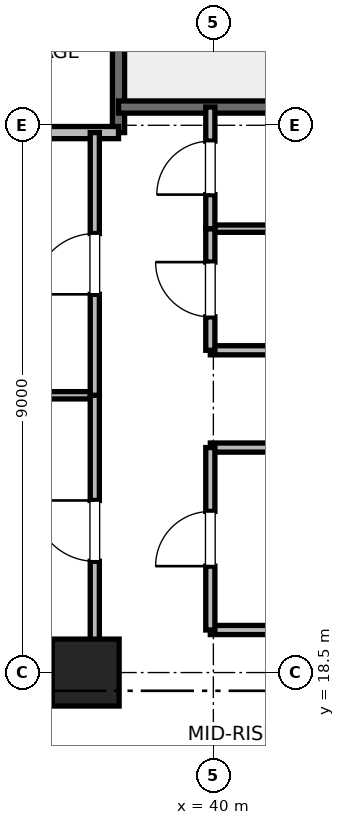
"""IFC4 building model, lengths in metres.
Left out: names, types, materials, properties, quantities, classifications, styles, units other than length and angle.
Written with IfcOpenShell. Run it as: python <this file> out.ifc"""

import sys

from ifc_helpers import new_model, si_unit, direction, frame, frame_2d, origin, origin_2d, place, context, subcontext, project, spatial, rectangle, extrude, element, fill, save


model = new_model("IFC4")
c1 = context("Model", 3, precision=1e-05, world=origin(), true_north=direction((0.0, 1.0)))
c2 = subcontext(c1, "Body", "Model", "MODEL_VIEW")
j1 = project(units=[si_unit("LENGTHUNIT", "METRE"), si_unit("PLANEANGLEUNIT", "RADIAN")], contexts=[c1])
p1 = place(None, origin())
s1 = spatial("IfcSite", under=j1, at=p1, CompositionType="ELEMENT")
p2 = place(p1, origin())
s2 = spatial("IfcBuilding", under=s1, at=p2, CompositionType="ELEMENT")
p3 = place(p2, frame((0.0, 0.0, 144.4)))
s3 = spatial("IfcBuildingStorey", under=s2, at=p3, CompositionType="ELEMENT", Elevation=144.4)
p4 = place(p3, frame((37.9, 18.5, 0.0), z_axis=(0.0, 0.0, 1.0), x_axis=(1.0, 0.0, 0.0)))
e1 = element("IfcColumn", 1, at=p4, inside=s3, PredefinedType="PILASTER", context=c2, shape_type="SweptSolid", body=[
    extrude(rectangle(XDim=1.1, YDim=1.1, at=origin_2d()), origin(), (0.0, 0.0, 1.0), 4.0),
])
p5 = place(p3, frame((29.0, 18.5, 0.0), z_axis=(0.0, 0.0, 1.0), x_axis=(1.0, 0.0, 0.0)))
e2 = element("IfcWall", 2, at=p5, inside=s3, PredefinedType="SHEAR", context=c2, shape_type="SweptSolid", body=[
    extrude(rectangle(XDim=9.2, YDim=0.55, at=frame_2d((4.6, 0.0))), origin(), (0.0, 0.0, 1.0), 3.775),
])
p6 = place(p3, frame((38.44, 27.38, 0.0), z_axis=(0.0, 0.0, 1.0), x_axis=(0.0, 1.0, 0.0)))
e3 = element("IfcWall", 3, at=p6, inside=s3, PredefinedType="SOLIDWALL", context=c2, shape_type="SweptSolid", body=[
    extrude(rectangle(XDim=8.87, YDim=0.2, at=frame_2d((4.435, 0.0))), origin(), (0.0, 0.0, 1.0), 3.775),
])
p7 = place(p3, frame((38.44, 27.8, 0.0), z_axis=(0.0, 0.0, 1.0), x_axis=(1.0, 0.0, 0.0)))
e4 = element("IfcWall", 4, at=p7, inside=s3, PredefinedType="SOLIDWALL", context=c2, shape_type="SweptSolid", body=[
    extrude(rectangle(XDim=3.32, YDim=0.2, at=frame_2d((1.66, 0.0))), origin(), (0.0, 0.0, 1.0), 3.775),
])
p8 = place(p3, frame((32.82, 27.38, 0.0), z_axis=(0.0, 0.0, 1.0), x_axis=(1.0, 0.0, 0.0)))
e5 = element("IfcWall", 5, at=p8, inside=s3, PredefinedType="PARTITIONING", context=c2, shape_type="SweptSolid", body=[
    extrude(rectangle(XDim=5.62, YDim=0.2, at=frame_2d((2.81, 0.0))), origin(), (0.0, 0.0, 1.0), 3.775),
])
for number, where, z_axis, x_axis in (
    (6, (39.95, 19.2, 0.0), (0.0, 0.0, 1.0), (1.0, 0.0, 0.0)),
    (7, (39.95, 22.2, 0.0), (0.0, 0.0, 1.0), (1.0, 0.0, 0.0)),
    (8, (39.95, 23.8, 0.0), (0.0, 0.0, 1.0), (1.0, 0.0, 0.0)),
):
    element("IfcWall", number, at=place(p3, frame(where, z_axis=z_axis, x_axis=x_axis)), inside=s3, PredefinedType="PARTITIONING", context=c2, shape_type="SweptSolid", body=[
        extrude(rectangle(XDim=1.81, YDim=0.15, at=frame_2d((0.905, 0.0))), origin(), (0.0, 0.0, 1.0), 2.85),
    ])
p9 = place(p3, frame((39.95, 25.8, 0.0), z_axis=(0.0, 0.0, 1.0), x_axis=(1.0, 0.0, 0.0)))
e9 = element("IfcWall", 9, at=p9, inside=s3, PredefinedType="PARTITIONING", context=c2, shape_type="SweptSolid", body=[
    extrude(rectangle(XDim=1.81, YDim=0.12, at=frame_2d((0.905, 0.0))), origin(), (0.0, 0.0, 1.0), 2.85),
])
p10 = place(p3, frame((39.95, 19.2, 0.0), z_axis=(0.0, 0.0, 1.0), x_axis=(0.0, 1.0, 0.0)))
e10 = element("IfcWall", 10, at=p10, inside=s3, PredefinedType="PARTITIONING", context=c2, shape_type="SweptSolid", body=[
    extrude(rectangle(XDim=3.0, YDim=0.15, at=frame_2d((1.5, 0.0))), origin(), (0.0, 0.0, 1.0), 2.85),
])
p11 = place(p10, frame((1.05, 0.0, 0.0)))
e11 = element("IfcOpeningElement", 11, at=p11, cuts=e10, PredefinedType="OPENING", context=c2, shape_type="SweptSolid", body=[
    extrude(rectangle(XDim=0.9, YDim=2.1, at=frame_2d((0.45, 1.05))), frame((0.0, 0.075, 0.0), z_axis=(0.0, -1.0, 0.0), x_axis=(1.0, 0.0, 0.0)), (0.0, 0.0, 1.0), 0.15),
])
p12 = place(p3, frame((39.95, 23.8, 0.0), z_axis=(0.0, 0.0, 1.0), x_axis=(0.0, 1.0, 0.0)))
e12 = element("IfcWall", 12, at=p12, inside=s3, PredefinedType="PARTITIONING", context=c2, shape_type="SweptSolid", body=[
    extrude(rectangle(XDim=2.0, YDim=0.15, at=frame_2d((1.0, 0.0))), origin(), (0.0, 0.0, 1.0), 2.85),
])
p13 = place(p12, frame((0.55, 0.0, 0.0)))
e13 = element("IfcOpeningElement", 13, at=p13, cuts=e12, PredefinedType="OPENING", context=c2, shape_type="SweptSolid", body=[
    extrude(rectangle(XDim=0.9, YDim=2.1, at=frame_2d((0.45, 1.05))), frame((0.0, 0.075, 0.0), z_axis=(0.0, -1.0, 0.0), x_axis=(1.0, 0.0, 0.0)), (0.0, 0.0, 1.0), 0.15),
])
p14 = place(p3, frame((39.95, 25.8, 0.0), z_axis=(0.0, 0.0, 1.0), x_axis=(0.0, 1.0, 0.0)))
e14 = element("IfcWall", 14, at=p14, inside=s3, PredefinedType="PARTITIONING", context=c2, shape_type="SweptSolid", body=[
    extrude(rectangle(XDim=2.0, YDim=0.15, at=frame_2d((1.0, 0.0))), origin(), (0.0, 0.0, 1.0), 2.85),
])
p15 = place(p14, frame((0.56, 0.0, 0.0)))
e15 = element("IfcOpeningElement", 15, at=p15, cuts=e14, PredefinedType="OPENING", context=c2, shape_type="SweptSolid", body=[
    extrude(rectangle(XDim=0.88, YDim=2.1, at=frame_2d((0.44, 1.05))), frame((0.0, 0.075, 0.0), z_axis=(0.0, -1.0, 0.0), x_axis=(1.0, 0.0, 0.0)), (0.0, 0.0, 1.0), 0.15),
])
p16 = place(p3, frame((32.82, 23.06, 0.0), z_axis=(0.0, 0.0, 1.0), x_axis=(1.0, 0.0, 0.0)))
e16 = element("IfcWall", 16, at=p16, inside=s3, PredefinedType="PARTITIONING", context=c2, shape_type="SweptSolid", body=[
    extrude(rectangle(XDim=5.23, YDim=0.12, at=frame_2d((2.615, 0.0))), origin(), (0.0, 0.0, 1.0), 2.85),
])
p17 = place(p3, frame((38.05, 18.6, 0.0), z_axis=(0.0, 0.0, 1.0), x_axis=(0.0, 1.0, 0.0)))
e17 = element("IfcWall", 17, at=p17, inside=s3, PredefinedType="PARTITIONING", context=c2, shape_type="SweptSolid", body=[
    extrude(rectangle(XDim=4.46, YDim=0.15, at=frame_2d((2.23, 0.0))), origin(), (0.0, 0.0, 1.0), 2.755),
])
p18 = place(p17, frame((1.73, 0.0, 0.0)))
e18 = element("IfcOpeningElement", 18, at=p18, cuts=e17, PredefinedType="OPENING", context=c2, shape_type="SweptSolid", body=[
    extrude(rectangle(XDim=1.0, YDim=2.15, at=frame_2d((0.5, 1.075))), frame((0.0, 0.075, 0.0), z_axis=(0.0, -1.0, 0.0), x_axis=(1.0, 0.0, 0.0)), (0.0, 0.0, 1.0), 0.15),
])
p19 = place(p3, frame((38.05, 23.06, 0.0), z_axis=(0.0, 0.0, 1.0), x_axis=(0.0, 1.0, 0.0)))
e19 = element("IfcWall", 19, at=p19, inside=s3, PredefinedType="PARTITIONING", context=c2, shape_type="SweptSolid", body=[
    extrude(rectangle(XDim=4.32, YDim=0.15, at=frame_2d((2.16, 0.0))), origin(), (0.0, 0.0, 1.0), 2.85),
])
p20 = place(p19, frame((1.66, 0.0, 0.0)))
e20 = element("IfcOpeningElement", 20, at=p20, cuts=e19, PredefinedType="OPENING", context=c2, shape_type="SweptSolid", body=[
    extrude(rectangle(XDim=1.0, YDim=2.15, at=frame_2d((0.5, 1.075))), frame((0.0, 0.075, 0.0), z_axis=(0.0, -1.0, 0.0), x_axis=(1.0, 0.0, 0.0)), (0.0, 0.0, 1.0), 0.15),
])
p21 = place(p11, origin())
e21 = element("IfcDoor", 21, at=p21, inside=s3, OperationType="SINGLE_SWING_LEFT", PredefinedType="DOOR", context=c2, shape_type="SweptSolid", body=[
    extrude(rectangle(XDim=0.9, YDim=2.1, at=frame_2d((0.45, 1.05))), frame((0.0, 0.025, 0.0), z_axis=(0.0, -1.0, 0.0), x_axis=(1.0, 0.0, 0.0)), (0.0, 0.0, 1.0), 0.05),
])
fill(e11, e21)
p22 = place(p13, origin())
e22 = element("IfcDoor", 22, at=p22, inside=s3, OperationType="SINGLE_SWING_RIGHT", PredefinedType="DOOR", context=c2, shape_type="SweptSolid", body=[
    extrude(rectangle(XDim=0.9, YDim=2.1, at=frame_2d((0.45, 1.05))), frame((0.0, 0.025, 0.0), z_axis=(0.0, -1.0, 0.0), x_axis=(1.0, 0.0, 0.0)), (0.0, 0.0, 1.0), 0.05),
])
fill(e13, e22)
p23 = place(p15, origin())
e23 = element("IfcDoor", 23, at=p23, inside=s3, OperationType="SINGLE_SWING_LEFT", PredefinedType="DOOR", context=c2, shape_type="SweptSolid", body=[
    extrude(rectangle(XDim=0.88, YDim=2.1, at=frame_2d((0.44, 1.05))), frame((0.0, 0.025, 0.0), z_axis=(0.0, -1.0, 0.0), x_axis=(1.0, 0.0, 0.0)), (0.0, 0.0, 1.0), 0.05),
])
fill(e15, e23)
p24 = place(p18, origin())
e24 = element("IfcDoor", 24, at=p24, inside=s3, OperationType="SINGLE_SWING_RIGHT", PredefinedType="DOOR", context=c2, shape_type="SweptSolid", body=[
    extrude(rectangle(XDim=1.0, YDim=2.15, at=frame_2d((0.5, 1.075))), frame((0.0, 0.025, 0.0), z_axis=(0.0, -1.0, 0.0), x_axis=(1.0, 0.0, 0.0)), (0.0, 0.0, 1.0), 0.05),
])
fill(e18, e24)
p25 = place(p20, origin())
e25 = element("IfcDoor", 25, at=p25, inside=s3, OperationType="SINGLE_SWING_LEFT", PredefinedType="DOOR", context=c2, shape_type="SweptSolid", body=[
    extrude(rectangle(XDim=1.0, YDim=2.15, at=frame_2d((0.5, 1.075))), frame((0.0, 0.025, 0.0), z_axis=(0.0, -1.0, 0.0), x_axis=(1.0, 0.0, 0.0)), (0.0, 0.0, 1.0), 0.05),
])
fill(e20, e25)
save(model, sys.argv[1])
